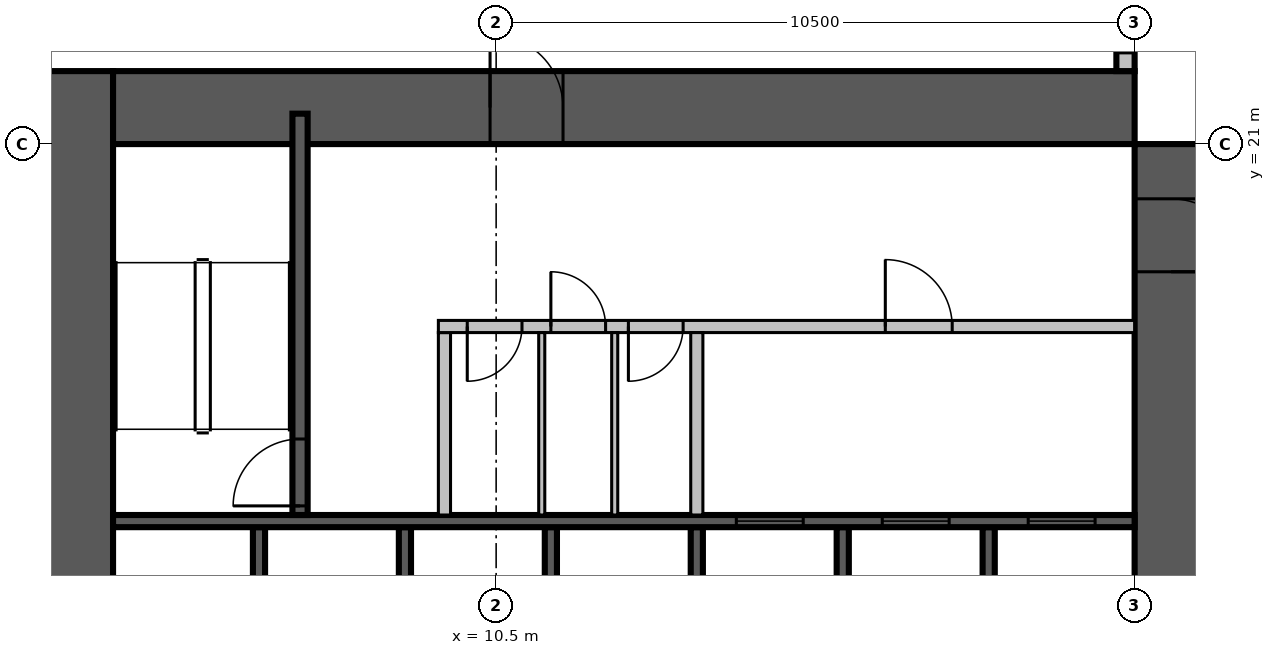
"""IFC4 building model, lengths in metres.
Left out: names, types, materials, properties, quantities, classifications, styles, units other than length and angle.
Written with IfcOpenShell. Run it as: python <this file> out.ifc"""

import sys

from ifc_helpers import new_model, si_unit, direction, frame, frame_2d, origin, place, context, subcontext, project, spatial, rectangle, extrude, source, transform, mapped, element, fill, save


model = new_model("IFC4")
c1 = context("Model", 3, precision=1e-05, world=origin(), true_north=direction((0.0, 1.0)))
c2 = subcontext(c1, "Body", "Model", "MODEL_VIEW")
j1 = project(units=[si_unit("LENGTHUNIT", "METRE"), si_unit("PLANEANGLEUNIT", "RADIAN")], contexts=[c1])
p1 = place(None, origin())
s1 = spatial("IfcSite", under=j1, at=p1, CompositionType="ELEMENT")
p2 = place(p1, origin())
s2 = spatial("IfcBuilding", under=s1, at=p2, CompositionType="ELEMENT")
p3 = place(p2, frame((0.0, 0.0, 40.5)))
s3 = spatial("IfcBuildingStorey", under=s2, at=p3, CompositionType="ELEMENT", Elevation=40.5)
p4 = place(p3, frame((3.6, 4.2, 0.0), z_axis=(0.0, 0.0, 1.0), x_axis=(0.0, 1.0, 0.0)))
e1 = element("IfcWall", 1, at=p4, inside=s3, PredefinedType="SHEAR", context=c2, shape_type="SweptSolid", body=[
    extrude(rectangle(XDim=18.0, YDim=1.2, at=frame_2d((9.0, 0.0))), origin(), (0.0, 0.0, 1.0), 4.2),
])
m1 = source(origin(), c2, "Body", "SweptSolid", [
    extrude(rectangle(XDim=2.2, YDim=2.1, at=frame_2d((1.1, 1.05))), frame((0.0, 0.61, 0.0), z_axis=(0.0, -1.0, 0.0), x_axis=(1.0, 0.0, 0.0)), (0.0, 0.0, 1.0), 1.22),
])
p5 = place(p4, frame((4.2, 0.0, 0.0)))
e2 = element("IfcOpeningElement", 2, at=p5, cuts=e1, PredefinedType="OPENING", context=c2, shape_type="MappedRepresentation", body=[
    mapped(m1, transform((0.0, 0.0, 0.0), scale=1.0)),
])
p6 = place(p3, frame((21.6, 4.2, 0.0), z_axis=(0.0, 0.0, 1.0), x_axis=(0.0, 1.0, 0.0)))
e3 = element("IfcWall", 3, at=p6, inside=s3, PredefinedType="SHEAR", context=c2, shape_type="SweptSolid", body=[
    extrude(rectangle(XDim=16.8, YDim=1.2, at=frame_2d((8.4, 0.0))), origin(), (0.0, 0.0, 1.0), 4.2),
])
p7 = place(p6, frame((4.2, 0.0, 0.0)))
e4 = element("IfcOpeningElement", 4, at=p7, cuts=e3, PredefinedType="OPENING", context=c2, shape_type="MappedRepresentation", body=[
    mapped(m1, transform((0.0, 0.0, 0.0), scale=1.0)),
])
m2 = source(origin(), c2, "Body", "SweptSolid", [
    extrude(rectangle(XDim=1.2, YDim=2.1, at=frame_2d((0.6, 1.05))), frame((0.0, 0.61, 0.0), z_axis=(0.0, -1.0, 0.0), x_axis=(1.0, 0.0, 0.0)), (0.0, 0.0, 1.0), 1.22),
])
p8 = place(p6, frame((14.7, 0.0, 0.0)))
e5 = element("IfcOpeningElement", 5, at=p8, cuts=e3, PredefinedType="OPENING", context=c2, shape_type="MappedRepresentation", body=[
    mapped(m2, transform((0.0, 0.0, 0.0), scale=1.0)),
])
m3 = source(origin(), c2, "Body", "SweptSolid", [
    extrude(rectangle(XDim=16.8, YDim=1.2, at=frame_2d((8.4, 0.0))), origin(), (0.0, 0.0, 1.0), 4.2),
])
p9 = place(p3, frame((4.2, 21.6, 0.0), z_axis=(0.0, 0.0, 1.0), x_axis=(1.0, 0.0, 0.0)))
e6 = element("IfcWall", 6, at=p9, inside=s3, PredefinedType="SHEAR", context=c2, shape_type="MappedRepresentation", body=[
    mapped(m3, transform((0.0, 0.0, 0.0), scale=1.0)),
])
p10 = place(p9, frame((6.2, 0.0, 0.0)))
e7 = element("IfcOpeningElement", 7, at=p10, cuts=e6, PredefinedType="OPENING", context=c2, shape_type="MappedRepresentation", body=[
    mapped(m2, transform((0.0, 0.0, 0.0), scale=1.0)),
])
p11 = place(p3, frame((20.85, 22.2, 0.0), z_axis=(0.0, 0.0, 1.0), x_axis=(0.0, 1.0, 0.0)))
e8 = element("IfcWall", 8, at=p11, inside=s3, PredefinedType="STANDARD", context=c2, shape_type="SweptSolid", body=[
    extrude(rectangle(XDim=3.0, YDim=0.3, at=frame_2d((1.5, 0.0))), origin(), (0.0, 0.0, 1.0), 3.8),
])
m4 = source(origin(), c2, "Body", "SweptSolid", [
    extrude(rectangle(XDim=1.2, YDim=2.7, at=frame_2d((0.6, 1.35))), frame((0.0, 0.16, 0.0), z_axis=(0.0, -1.0, 0.0), x_axis=(1.0, 0.0, 0.0)), (0.0, 0.0, 1.0), 0.32),
])
p12 = place(p11, frame((0.3, 0.0, 0.6)))
e9 = element("IfcOpeningElement", 9, at=p12, cuts=e8, PredefinedType="OPENING", context=c2, shape_type="MappedRepresentation", body=[
    mapped(m4, transform((0.0, 0.0, 0.0), scale=1.0)),
])
p13 = place(p3, frame((6.6, 11.7, 0.0), z_axis=(0.0, 0.0, 1.0), x_axis=(0.0, 1.0, 0.0)))
e10 = element("IfcWall", 10, at=p13, inside=s3, PredefinedType="SOLIDWALL", context=c2, shape_type="SweptSolid", body=[
    extrude(rectangle(XDim=3.0, YDim=0.2, at=frame_2d((1.5, 0.0))), origin(), (0.0, 0.0, 1.0), 4.2),
])
m5 = source(origin(), c2, "Body", "SweptSolid", [
    extrude(rectangle(XDim=3.0, YDim=0.2, at=frame_2d((1.5, 0.0))), origin(), (0.0, 0.0, 1.0), 4.2),
])
for number, where, z_axis, x_axis in (
    (11, (9.0, 11.7, 0.0), (0.0, 0.0, 1.0), (0.0, 1.0, 0.0)),
    (12, (11.4, 11.7, 0.0), (0.0, 0.0, 1.0), (0.0, 1.0, 0.0)),
    (13, (13.8, 11.7, 0.0), (0.0, 0.0, 1.0), (0.0, 1.0, 0.0)),
    (14, (16.2, 11.7, 0.0), (0.0, 0.0, 1.0), (0.0, 1.0, 0.0)),
    (15, (18.6, 11.7, 0.0), (0.0, 0.0, 1.0), (0.0, 1.0, 0.0)),
):
    element("IfcWall", number, at=place(p3, frame(where, z_axis=z_axis, x_axis=x_axis)), inside=s3, PredefinedType="SOLIDWALL", context=c2, shape_type="MappedRepresentation", body=[
        mapped(m5, transform((0.0, 0.0, 0.0), scale=1.0)),
    ])
m6 = source(origin(), c2, "Body", "SweptSolid", [
    extrude(rectangle(XDim=16.8, YDim=0.2, at=frame_2d((8.4, 0.0))), origin(), (0.0, 0.0, 1.0), 4.2),
])
p14 = place(p3, frame((4.2, 14.8, 0.0), z_axis=(0.0, 0.0, 1.0), x_axis=(1.0, 0.0, 0.0)))
e16 = element("IfcWall", 16, at=p14, inside=s3, PredefinedType="SOLIDWALL", context=c2, shape_type="MappedRepresentation", body=[
    mapped(m6, transform((0.0, 0.0, 0.0), scale=1.0)),
])
m7 = source(origin(), c2, "Body", "SweptSolid", [
    extrude(rectangle(XDim=1.1, YDim=2.1, at=frame_2d((0.55, 1.05))), frame((0.0, 0.11, 0.0), z_axis=(0.0, -1.0, 0.0), x_axis=(1.0, 0.0, 0.0)), (0.0, 0.0, 1.0), 0.22),
])
p15 = place(p14, frame((10.25, 0.0, 0.0)))
e17 = element("IfcOpeningElement", 17, at=p15, cuts=e16, PredefinedType="OPENING", context=c2, shape_type="MappedRepresentation", body=[
    mapped(m7, transform((0.0, 0.0, 0.0), scale=1.0)),
])
p16 = place(p14, frame((12.65, 0.0, 0.0)))
e18 = element("IfcOpeningElement", 18, at=p16, cuts=e16, PredefinedType="OPENING", context=c2, shape_type="MappedRepresentation", body=[
    mapped(m7, transform((0.0, 0.0, 0.0), scale=1.0)),
])
p17 = place(p14, frame((15.05, 0.0, 0.0)))
e19 = element("IfcOpeningElement", 19, at=p17, cuts=e16, PredefinedType="OPENING", context=c2, shape_type="MappedRepresentation", body=[
    mapped(m7, transform((0.0, 0.0, 0.0), scale=1.0)),
])
p18 = place(p3, frame((7.275, 14.9, 0.0), z_axis=(0.0, 0.0, 1.0), x_axis=(0.0, 1.0, 0.0)))
e20 = element("IfcWall", 20, at=p18, inside=s3, PredefinedType="SOLIDWALL", context=c2, shape_type="SweptSolid", body=[
    extrude(rectangle(XDim=6.6, YDim=0.25, at=frame_2d((3.3, 0.0))), origin(), (0.0, 0.0, 1.0), 3.8),
])
m8 = source(origin(), c2, "Body", "SweptSolid", [
    extrude(rectangle(XDim=1.1, YDim=2.1, at=frame_2d((0.55, 1.05))), frame((0.0, 0.135, 0.0), z_axis=(0.0, -1.0, 0.0), x_axis=(1.0, 0.0, 0.0)), (0.0, 0.0, 1.0), 0.27),
])
p19 = place(p18, frame((0.15, 0.0, 0.0)))
e21 = element("IfcOpeningElement", 21, at=p19, cuts=e20, PredefinedType="OPENING", context=c2, shape_type="MappedRepresentation", body=[
    mapped(m8, transform((0.0, 0.0, 0.0), scale=1.0)),
])
p20 = place(p3, frame((9.65, 14.9, 0.0), z_axis=(0.0, 0.0, 1.0), x_axis=(0.0, 1.0, 0.0)))
e22 = element("IfcWall", 22, at=p20, inside=s3, PredefinedType="PARTITIONING", context=c2, shape_type="SweptSolid", body=[
    extrude(rectangle(XDim=3.0, YDim=0.2, at=frame_2d((1.5, 0.0))), origin(), (0.0, 0.0, 1.0), 3.8),
])
p21 = place(p3, frame((9.55, 18.0, 0.0), z_axis=(0.0, 0.0, 1.0), x_axis=(1.0, 0.0, 0.0)))
e23 = element("IfcWall", 23, at=p21, inside=s3, PredefinedType="PARTITIONING", context=c2, shape_type="SweptSolid", body=[
    extrude(rectangle(XDim=11.45, YDim=0.2, at=frame_2d((5.725, 0.0))), origin(), (0.0, 0.0, 1.0), 3.8),
])
m9 = source(origin(), c2, "Body", "SweptSolid", [
    extrude(rectangle(XDim=0.9, YDim=2.1, at=frame_2d((0.45, 1.05))), frame((0.0, 0.11, 0.0), z_axis=(0.0, -1.0, 0.0), x_axis=(1.0, 0.0, 0.0)), (0.0, 0.0, 1.0), 0.22),
])
p22 = place(p21, frame((0.475, 0.0, 0.0)))
e24 = element("IfcOpeningElement", 24, at=p22, cuts=e23, PredefinedType="OPENING", context=c2, shape_type="MappedRepresentation", body=[
    mapped(m9, transform((0.0, 0.0, 0.0), scale=1.0)),
])
p23 = place(p21, frame((1.85, 0.0, 0.0)))
e25 = element("IfcOpeningElement", 25, at=p23, cuts=e23, PredefinedType="OPENING", context=c2, shape_type="MappedRepresentation", body=[
    mapped(m9, transform((0.0, 0.0, 0.0), scale=1.0)),
])
p24 = place(p21, frame((3.125, 0.0, 0.0)))
e26 = element("IfcOpeningElement", 26, at=p24, cuts=e23, PredefinedType="OPENING", context=c2, shape_type="MappedRepresentation", body=[
    mapped(m9, transform((0.0, 0.0, 0.0), scale=1.0)),
])
p25 = place(p21, frame((7.35, 0.0, 0.0)))
e27 = element("IfcOpeningElement", 27, at=p25, cuts=e23, PredefinedType="OPENING", context=c2, shape_type="MappedRepresentation", body=[
    mapped(m7, transform((0.0, 0.0, 0.0), scale=1.0)),
])
m10 = source(origin(), c2, "Body", "SweptSolid", [
    extrude(rectangle(XDim=3.0, YDim=0.2, at=frame_2d((1.5, 0.0))), origin(), (0.0, 0.0, 1.0), 3.8),
])
p26 = place(p3, frame((13.8, 14.9, 0.0), z_axis=(0.0, 0.0, 1.0), x_axis=(0.0, 1.0, 0.0)))
e28 = element("IfcWall", 28, at=p26, inside=s3, PredefinedType="PARTITIONING", context=c2, shape_type="MappedRepresentation", body=[
    mapped(m10, transform((0.0, 0.0, 0.0), scale=1.0)),
])
p27 = place(p3, frame((11.25, 14.9, 0.0), z_axis=(0.0, 0.0, 1.0), x_axis=(0.0, 1.0, 0.0)))
e29 = element("IfcWall", 29, at=p27, inside=s3, PredefinedType="PARTITIONING", context=c2, shape_type="SweptSolid", body=[
    extrude(rectangle(XDim=3.0, YDim=0.1, at=frame_2d((1.5, 0.0))), origin(), (0.0, 0.0, 1.0), 3.8),
])
m11 = source(origin(), c2, "Body", "SweptSolid", [
    extrude(rectangle(XDim=3.0, YDim=0.1, at=frame_2d((1.5, 0.0))), origin(), (0.0, 0.0, 1.0), 3.8),
])
p28 = place(p3, frame((12.45, 14.9, 0.0), z_axis=(0.0, 0.0, 1.0), x_axis=(0.0, 1.0, 0.0)))
e30 = element("IfcWall", 30, at=p28, inside=s3, PredefinedType="PARTITIONING", context=c2, shape_type="MappedRepresentation", body=[
    mapped(m11, transform((0.0, 0.0, 0.0), scale=1.0)),
])
m12 = source(origin(), c2, "Body", "SweptSolid", [
    extrude(rectangle(XDim=1.1, YDim=2.1, at=frame_2d((0.55, 1.05))), frame((0.0, 0.025, 0.0), z_axis=(0.0, -1.0, 0.0), x_axis=(1.0, 0.0, 0.0)), (0.0, 0.0, 1.0), 0.05),
])
p29 = place(p15, origin())
e31 = element("IfcDoor", 31, at=p29, inside=s3, OperationType="SLIDING_TO_LEFT", PredefinedType="DOOR", context=c2, shape_type="MappedRepresentation", body=[
    mapped(m12, transform((0.0, 0.0, 0.0), scale=1.0)),
])
fill(e17, e31)
p30 = place(p16, origin())
e32 = element("IfcDoor", 32, at=p30, inside=s3, OperationType="SLIDING_TO_LEFT", PredefinedType="DOOR", context=c2, shape_type="MappedRepresentation", body=[
    mapped(m12, transform((0.0, 0.0, 0.0), scale=1.0)),
])
fill(e18, e32)
p31 = place(p17, origin())
e33 = element("IfcDoor", 33, at=p31, inside=s3, OperationType="SLIDING_TO_LEFT", PredefinedType="DOOR", context=c2, shape_type="MappedRepresentation", body=[
    mapped(m12, transform((0.0, 0.0, 0.0), scale=1.0)),
])
fill(e19, e33)
p32 = place(p19, origin())
e34 = element("IfcDoor", 34, at=p32, inside=s3, OperationType="SINGLE_SWING_LEFT", PredefinedType="DOOR", context=c2, shape_type="MappedRepresentation", body=[
    mapped(m12, transform((0.0, 0.0, 0.0), scale=1.0)),
])
fill(e21, e34)
m13 = source(origin(), c2, "Body", "SweptSolid", [
    extrude(rectangle(XDim=0.9, YDim=2.1, at=frame_2d((0.45, 1.05))), frame((0.0, 0.025, 0.0), z_axis=(0.0, -1.0, 0.0), x_axis=(1.0, 0.0, 0.0)), (0.0, 0.0, 1.0), 0.05),
])
p33 = place(p22, origin())
e35 = element("IfcDoor", 35, at=p33, inside=s3, OperationType="SINGLE_SWING_RIGHT", PredefinedType="DOOR", context=c2, shape_type="MappedRepresentation", body=[
    mapped(m13, transform((0.0, 0.0, 0.0), scale=1.0)),
])
fill(e24, e35)
p34 = place(p23, origin())
e36 = element("IfcDoor", 36, at=p34, inside=s3, OperationType="SINGLE_SWING_LEFT", PredefinedType="DOOR", context=c2, shape_type="MappedRepresentation", body=[
    mapped(m13, transform((0.0, 0.0, 0.0), scale=1.0)),
])
fill(e25, e36)
p35 = place(p24, origin())
e37 = element("IfcDoor", 37, at=p35, inside=s3, OperationType="SINGLE_SWING_RIGHT", PredefinedType="DOOR", context=c2, shape_type="MappedRepresentation", body=[
    mapped(m13, transform((0.0, 0.0, 0.0), scale=1.0)),
])
fill(e26, e37)
p36 = place(p25, origin())
e38 = element("IfcDoor", 38, at=p36, inside=s3, OperationType="SINGLE_SWING_LEFT", PredefinedType="DOOR", context=c2, shape_type="MappedRepresentation", body=[
    mapped(m12, transform((0.0, 0.0, 0.0), scale=1.0)),
])
fill(e27, e38)
m14 = source(origin(), c2, "Body", "SweptSolid", [
    extrude(rectangle(XDim=1.2, YDim=2.1, at=frame_2d((0.6, 1.05))), frame((0.0, 0.025, 0.0), z_axis=(0.0, -1.0, 0.0), x_axis=(1.0, 0.0, 0.0)), (0.0, 0.0, 1.0), 0.05),
])
p37 = place(p10, origin())
e39 = element("IfcDoor", 39, at=p37, inside=s3, OperationType="SINGLE_SWING_LEFT", PredefinedType="DOOR", context=c2, shape_type="MappedRepresentation", body=[
    mapped(m14, transform((0.0, 0.0, 0.0), scale=1.0)),
])
fill(e7, e39)
p38 = place(p8, origin())
e40 = element("IfcDoor", 40, at=p38, inside=s3, OperationType="SINGLE_SWING_RIGHT", PredefinedType="DOOR", context=c2, shape_type="MappedRepresentation", body=[
    mapped(m14, transform((0.0, 0.0, 0.0), scale=1.0)),
])
fill(e5, e40)
save(model, sys.argv[1])
